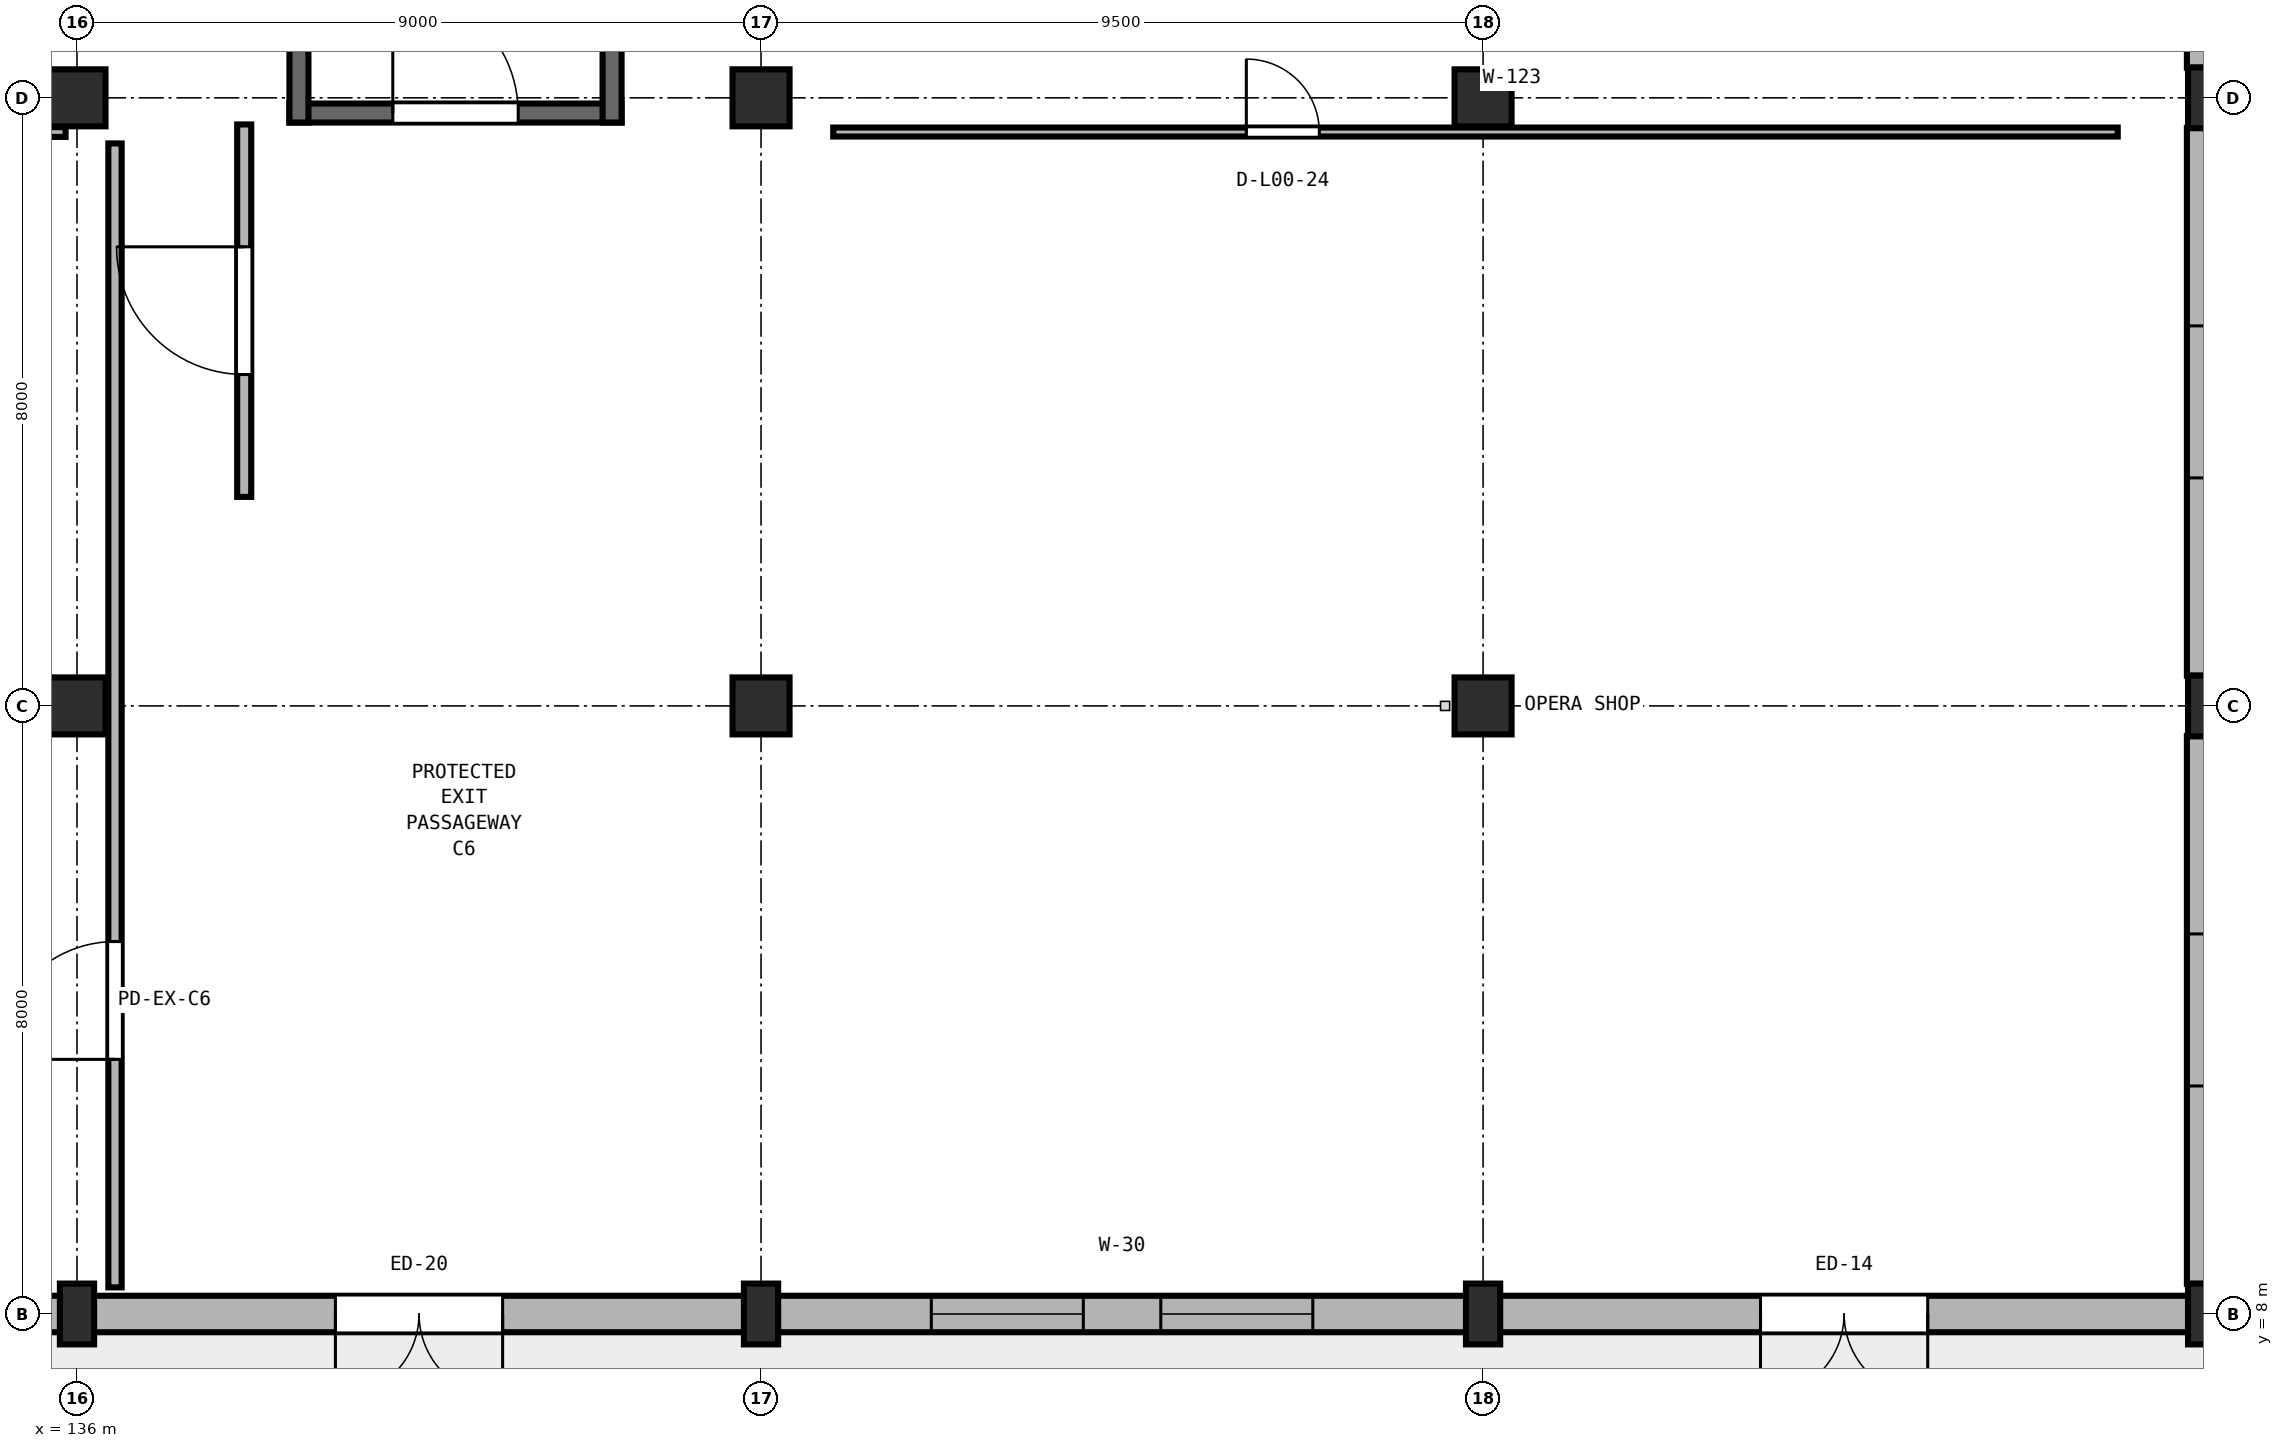
"""IFC4 building model, lengths in metres.
Left out: names, types, materials, properties, quantities, classifications, styles, units other than length and angle.
Written with IfcOpenShell. Run it as: python <this file> out.ifc"""

import sys

from ifc_helpers import new_model, si_unit, direction, frame, frame_2d, origin, origin_2d, place, context, subcontext, project, spatial, rectangle, extrude, element, fill, save


model = new_model("IFC4")
c1 = context("Model", 3, precision=1e-05, world=origin(), true_north=direction((0.0, 1.0)))
c2 = subcontext(c1, "Body", "Model", "MODEL_VIEW")
j1 = project(units=[si_unit("LENGTHUNIT", "METRE"), si_unit("PLANEANGLEUNIT", "RADIAN")], contexts=[c1])
p1 = place(None, origin())
s1 = spatial("IfcSite", under=j1, at=p1, CompositionType="ELEMENT")
p2 = place(p1, origin())
s2 = spatial("IfcBuilding", under=s1, at=p2, CompositionType="ELEMENT")
p3 = place(p2, origin())
s3 = spatial("IfcBuildingStorey", under=s2, at=p3, CompositionType="ELEMENT", Elevation=0.0)
p4 = place(p3, frame((136.0, 8.0, 0.0), z_axis=(0.0, 0.0, 1.0), x_axis=(1.0, 0.0, 0.0)))
e1 = element("IfcColumn", 1, at=p4, inside=s3, PredefinedType="PILASTER", context=c2, shape_type="SweptSolid", body=[
    extrude(rectangle(XDim=0.45, YDim=0.8, at=origin_2d()), origin(), (0.0, 0.0, 1.0), 5.12),
])
for number, where, z_axis, x_axis in (
    (2, (136.0, 16.0, 0.0), (0.0, 0.0, 1.0), (1.0, 0.0, 0.0)),
    (3, (136.0, 24.0, 0.0), (0.0, 0.0, 1.0), (1.0, 0.0, 0.0)),
):
    element("IfcColumn", number, at=place(p3, frame(where, z_axis=z_axis, x_axis=x_axis)), inside=s3, PredefinedType="COLUMN", context=c2, shape_type="SweptSolid", body=[
        extrude(rectangle(XDim=0.75, YDim=0.75, at=origin_2d()), origin(), (0.0, 0.0, 1.0), 5.12),
    ])
p5 = place(p3, frame((145.0, 8.0, 0.0), z_axis=(0.0, 0.0, 1.0), x_axis=(1.0, 0.0, 0.0)))
e4 = element("IfcColumn", 4, at=p5, inside=s3, PredefinedType="PILASTER", context=c2, shape_type="SweptSolid", body=[
    extrude(rectangle(XDim=0.45, YDim=0.8, at=origin_2d()), origin(), (0.0, 0.0, 1.0), 5.12),
])
for number, where, z_axis, x_axis in (
    (5, (145.0, 16.0, 0.0), (0.0, 0.0, 1.0), (1.0, 0.0, 0.0)),
    (6, (145.0, 24.0, 0.0), (0.0, 0.0, 1.0), (1.0, 0.0, 0.0)),
):
    element("IfcColumn", number, at=place(p3, frame(where, z_axis=z_axis, x_axis=x_axis)), inside=s3, PredefinedType="COLUMN", context=c2, shape_type="SweptSolid", body=[
        extrude(rectangle(XDim=0.75, YDim=0.75, at=origin_2d()), origin(), (0.0, 0.0, 1.0), 5.12),
    ])
p6 = place(p3, frame((154.5, 8.0, 0.0), z_axis=(0.0, 0.0, 1.0), x_axis=(1.0, 0.0, 0.0)))
e7 = element("IfcColumn", 7, at=p6, inside=s3, PredefinedType="PILASTER", context=c2, shape_type="SweptSolid", body=[
    extrude(rectangle(XDim=0.45, YDim=0.8, at=origin_2d()), origin(), (0.0, 0.0, 1.0), 5.12),
])
for number, where, z_axis, x_axis in (
    (8, (154.5, 16.0, 0.0), (0.0, 0.0, 1.0), (1.0, 0.0, 0.0)),
    (9, (154.5, 24.0, 0.0), (0.0, 0.0, 1.0), (1.0, 0.0, 0.0)),
):
    element("IfcColumn", number, at=place(p3, frame(where, z_axis=z_axis, x_axis=x_axis)), inside=s3, PredefinedType="COLUMN", context=c2, shape_type="SweptSolid", body=[
        extrude(rectangle(XDim=0.75, YDim=0.75, at=origin_2d()), origin(), (0.0, 0.0, 1.0), 5.12),
    ])
for number, where, z_axis, x_axis in (
    (10, (164.0, 8.0, 0.0), (0.0, 0.0, 1.0), (1.0, 0.0, 0.0)),
    (11, (164.0, 16.0, 0.0), (0.0, 0.0, 1.0), (1.0, 0.0, 0.0)),
    (12, (164.0, 24.0, 0.0), (0.0, 0.0, 1.0), (1.0, 0.0, 0.0)),
):
    element("IfcColumn", number, at=place(p3, frame(where, z_axis=z_axis, x_axis=x_axis)), inside=s3, PredefinedType="PILASTER", context=c2, shape_type="SweptSolid", body=[
        extrude(rectangle(XDim=0.45, YDim=0.8, at=origin_2d()), origin(), (0.0, 0.0, 1.0), 5.12),
    ])
p7 = place(p3, frame((135.779, 8.0, 0.0), z_axis=(0.0, 0.0, 1.0), x_axis=(-1.0, 0.0, 0.0)))
e13 = element("IfcWall", 13, at=p7, inside=s3, PredefinedType="SOLIDWALL", context=c2, shape_type="SweptSolid", body=[
    extrude(rectangle(XDim=8.558, YDim=0.48, at=frame_2d((4.279, 0.0))), origin(), (0.0, 0.0, 1.0), 4.731),
])
p8 = place(p7, frame((3.079, 0.0, 0.0)))
e14 = element("IfcOpeningElement", 14, at=p8, cuts=e13, PredefinedType="OPENING", context=c2, shape_type="SweptSolid", body=[
    extrude(rectangle(XDim=2.4, YDim=2.5, at=frame_2d((1.2, 1.25))), frame((0.0, 0.25, 0.0), z_axis=(0.0, -1.0, 0.0), x_axis=(1.0, 0.0, 0.0)), (0.0, 0.0, 1.0), 0.5),
])
p9 = place(p3, frame((144.779, 8.0, 0.0), z_axis=(0.0, 0.0, 1.0), x_axis=(-1.0, 0.0, 0.0)))
e15 = element("IfcWall", 15, at=p9, inside=s3, PredefinedType="SOLIDWALL", context=c2, shape_type="SweptSolid", body=[
    extrude(rectangle(XDim=8.558, YDim=0.48, at=frame_2d((4.279, 0.0))), origin(), (0.0, 0.0, 1.0), 4.731),
])
p10 = place(p9, frame((3.179, 0.0, 0.0)))
e16 = element("IfcOpeningElement", 16, at=p10, cuts=e15, PredefinedType="OPENING", context=c2, shape_type="SweptSolid", body=[
    extrude(rectangle(XDim=2.2, YDim=2.4, at=frame_2d((1.1, 1.2))), frame((0.0, 0.25, 0.0), z_axis=(0.0, -1.0, 0.0), x_axis=(1.0, 0.0, 0.0)), (0.0, 0.0, 1.0), 0.5),
])
p11 = place(p3, frame((145.221, 8.0, 0.0), z_axis=(0.0, 0.0, 1.0), x_axis=(1.0, 0.0, 0.0)))
e17 = element("IfcWall", 17, at=p11, inside=s3, PredefinedType="SOLIDWALL", context=c2, shape_type="SweptSolid", body=[
    extrude(rectangle(XDim=9.058, YDim=0.48, at=frame_2d((4.529, 0.0))), origin(), (0.0, 0.0, 1.0), 4.63),
])
p12 = place(p11, frame((2.019, 0.0, 0.75)))
e18 = element("IfcOpeningElement", 18, at=p12, cuts=e17, PredefinedType="OPENING", context=c2, shape_type="SweptSolid", body=[
    extrude(rectangle(XDim=2.0, YDim=2.9, at=frame_2d((1.0, 1.45))), frame((0.0, 0.25, 0.0), z_axis=(0.0, -1.0, 0.0), x_axis=(1.0, 0.0, 0.0)), (0.0, 0.0, 1.0), 0.5),
])
p13 = place(p11, frame((5.039, 0.0, 0.75)))
e19 = element("IfcOpeningElement", 19, at=p13, cuts=e17, PredefinedType="OPENING", context=c2, shape_type="SweptSolid", body=[
    extrude(rectangle(XDim=2.0, YDim=2.9, at=frame_2d((1.0, 1.45))), frame((0.0, 0.25, 0.0), z_axis=(0.0, -1.0, 0.0), x_axis=(1.0, 0.0, 0.0)), (0.0, 0.0, 1.0), 0.5),
])
p14 = place(p3, frame((163.779, 8.0, 0.0), z_axis=(0.0, 0.0, 1.0), x_axis=(-1.0, 0.0, 0.0)))
e20 = element("IfcWall", 20, at=p14, inside=s3, PredefinedType="SOLIDWALL", context=c2, shape_type="SweptSolid", body=[
    extrude(rectangle(XDim=9.058, YDim=0.48, at=frame_2d((4.529, 0.0))), origin(), (0.0, 0.0, 1.0), 4.63),
])
p15 = place(p14, frame((3.429, 0.0, 0.0)))
e21 = element("IfcOpeningElement", 21, at=p15, cuts=e20, PredefinedType="OPENING", context=c2, shape_type="SweptSolid", body=[
    extrude(rectangle(XDim=2.2, YDim=2.4, at=frame_2d((1.1, 1.2))), frame((0.0, 0.25, 0.0), z_axis=(0.0, -1.0, 0.0), x_axis=(1.0, 0.0, 0.0)), (0.0, 0.0, 1.0), 0.5),
])
p16 = place(p3, frame((164.0, 8.396, 0.0), z_axis=(0.0, 0.0, 1.0), x_axis=(0.0, 1.0, 0.0)))
e22 = element("IfcWall", 22, at=p16, inside=s3, PredefinedType="SOLIDWALL", context=c2, shape_type="SweptSolid", body=[
    extrude(rectangle(XDim=7.208, YDim=0.48, at=frame_2d((3.604, 0.0))), origin(), (0.0, 0.0, 1.0), 4.731),
])
p17 = place(p16, frame((2.604, 0.0, 0.85)))
e23 = element("IfcOpeningElement", 23, at=p17, cuts=e22, PredefinedType="OPENING", context=c2, shape_type="SweptSolid", body=[
    extrude(rectangle(XDim=2.0, YDim=2.9, at=frame_2d((1.0, 1.45))), frame((0.0, 0.25, 0.0), z_axis=(0.0, -1.0, 0.0), x_axis=(1.0, 0.0, 0.0)), (0.0, 0.0, 1.0), 0.5),
])
p18 = place(p3, frame((164.0, 16.396, 0.0), z_axis=(0.0, 0.0, 1.0), x_axis=(0.0, 1.0, 0.0)))
e24 = element("IfcWall", 24, at=p18, inside=s3, PredefinedType="SOLIDWALL", context=c2, shape_type="SweptSolid", body=[
    extrude(rectangle(XDim=7.208, YDim=0.48, at=frame_2d((3.604, 0.0))), origin(), (0.0, 0.0, 1.0), 4.731),
])
p19 = place(p18, frame((2.604, 0.0, 0.85)))
e25 = element("IfcOpeningElement", 25, at=p19, cuts=e24, PredefinedType="OPENING", context=c2, shape_type="SweptSolid", body=[
    extrude(rectangle(XDim=2.0, YDim=2.9, at=frame_2d((1.0, 1.45))), frame((0.0, 0.25, 0.0), z_axis=(0.0, -1.0, 0.0), x_axis=(1.0, 0.0, 0.0)), (0.0, 0.0, 1.0), 0.5),
])
p20 = place(p3, frame((164.0, 24.396, 0.0), z_axis=(0.0, 0.0, 1.0), x_axis=(0.0, 1.0, 0.0)))
e26 = element("IfcWall", 26, at=p20, inside=s3, PredefinedType="SOLIDWALL", context=c2, shape_type="SweptSolid", body=[
    extrude(rectangle(XDim=7.208, YDim=0.48, at=frame_2d((3.604, 0.0))), origin(), (0.0, 0.0, 1.0), 4.731),
])
p21 = place(p20, frame((2.554, 0.0, 0.0)))
e27 = element("IfcOpeningElement", 27, at=p21, cuts=e26, PredefinedType="OPENING", context=c2, shape_type="SweptSolid", body=[
    extrude(rectangle(XDim=2.1, YDim=2.35, at=frame_2d((1.05, 1.175))), frame((0.0, 0.25, 0.0), z_axis=(0.0, -1.0, 0.0), x_axis=(1.0, 0.0, 0.0)), (0.0, 0.0, 1.0), 0.5),
])
p22 = place(p3, frame((138.795, 23.8, 0.0), z_axis=(0.0, 0.0, 1.0), x_axis=(1.0, 0.0, 0.0)))
e28 = element("IfcWall", 28, at=p22, inside=s3, PredefinedType="SHEAR", context=c2, shape_type="SweptSolid", body=[
    extrude(rectangle(XDim=4.37, YDim=0.25, at=frame_2d((2.185, 0.0))), origin(), (0.0, 0.0, 1.0), 5.12),
])
p23 = place(p22, frame((1.36, 0.0, 0.0)))
e29 = element("IfcOpeningElement", 29, at=p23, cuts=e28, PredefinedType="OPENING", context=c2, shape_type="SweptSolid", body=[
    extrude(rectangle(XDim=1.65, YDim=2.22, at=frame_2d((0.825, 1.11))), frame((0.0, 0.135, 0.0), z_axis=(0.0, -1.0, 0.0), x_axis=(1.0, 0.0, 0.0)), (0.0, 0.0, 1.0), 0.27),
])
for number, where, z_axis, x_axis in (
    (30, (138.92, 23.675, 0.0), (0.0, 0.0, 1.0), (0.0, 1.0, 0.0)),
    (31, (143.04, 23.675, 0.0), (0.0, 0.0, 1.0), (0.0, 1.0, 0.0)),
):
    element("IfcWall", number, at=place(p3, frame(where, z_axis=z_axis, x_axis=x_axis)), inside=s3, PredefinedType="SHEAR", context=c2, shape_type="SweptSolid", body=[
        extrude(rectangle(XDim=11.09, YDim=0.25, at=frame_2d((5.545, 0.0))), origin(), (0.0, 0.0, 1.0), 5.12),
    ])
p24 = place(p3, frame((138.2, 18.75, 0.0), z_axis=(0.0, 0.0, 1.0), x_axis=(0.0, 1.0, 0.0)))
e32 = element("IfcWall", 32, at=p24, inside=s3, PredefinedType="PARTITIONING", context=c2, shape_type="SweptSolid", body=[
    extrude(rectangle(XDim=4.9, YDim=0.185, at=frame_2d((2.45, 0.0))), origin(), (0.0, 0.0, 1.0), 5.07),
])
p25 = place(p24, frame((1.61, 0.0, 0.0)))
e33 = element("IfcOpeningElement", 33, at=p25, cuts=e32, PredefinedType="OPENING", context=c2, shape_type="SweptSolid", body=[
    extrude(rectangle(XDim=1.68, YDim=2.25, at=frame_2d((0.84, 1.125))), frame((0.0, 0.103, 0.0), z_axis=(0.0, -1.0, 0.0), x_axis=(1.0, 0.0, 0.0)), (0.0, 0.0, 1.0), 0.205),
])
p26 = place(p3, frame((118.95, 23.55, 0.0), z_axis=(0.0, 0.0, 1.0), x_axis=(1.0, 0.0, 0.0)))
e34 = element("IfcWall", 34, at=p26, inside=s3, PredefinedType="PARTITIONING", context=c2, shape_type="SweptSolid", body=[
    extrude(rectangle(XDim=16.9, YDim=0.128, at=frame_2d((8.45, 0.0))), origin(), (0.0, 0.0, 1.0), 4.479),
])
p27 = place(p26, frame((5.415, 0.0, 0.0)))
e35 = element("IfcOpeningElement", 35, at=p27, cuts=e34, PredefinedType="OPENING", context=c2, shape_type="SweptSolid", body=[
    extrude(rectangle(XDim=1.0, YDim=2.15, at=frame_2d((0.5, 1.075))), frame((0.0, 0.074, 0.0), z_axis=(0.0, -1.0, 0.0), x_axis=(1.0, 0.0, 0.0)), (0.0, 0.0, 1.0), 0.148),
])
p28 = place(p3, frame((145.95, 23.55, 0.0), z_axis=(0.0, 0.0, 1.0), x_axis=(1.0, 0.0, 0.0)))
e36 = element("IfcWall", 36, at=p28, inside=s3, PredefinedType="PARTITIONING", context=c2, shape_type="SweptSolid", body=[
    extrude(rectangle(XDim=16.9, YDim=0.118, at=frame_2d((8.45, 0.0))), origin(), (0.0, 0.0, 1.0), 4.557),
])
p29 = place(p28, frame((5.435, 0.0, 0.0)))
e37 = element("IfcOpeningElement", 37, at=p29, cuts=e36, PredefinedType="OPENING", context=c2, shape_type="SweptSolid", body=[
    extrude(rectangle(XDim=0.96, YDim=2.15, at=frame_2d((0.48, 1.075))), frame((0.0, 0.069, 0.0), z_axis=(0.0, -1.0, 0.0), x_axis=(1.0, 0.0, 0.0)), (0.0, 0.0, 1.0), 0.138),
])
p30 = place(p3, frame((136.5, 8.35, 0.0), z_axis=(0.0, 0.0, 1.0), x_axis=(0.0, 1.0, 0.0)))
e38 = element("IfcWall", 38, at=p30, inside=s3, PredefinedType="PARTITIONING", context=c2, shape_type="SweptSolid", body=[
    extrude(rectangle(XDim=15.05, YDim=0.175, at=frame_2d((7.525, 0.0))), origin(), (0.0, 0.0, 1.0), 5.08),
])
p31 = place(p30, frame((3.0, 0.0, 0.0)))
e39 = element("IfcOpeningElement", 39, at=p31, cuts=e38, PredefinedType="OPENING", context=c2, shape_type="SweptSolid", body=[
    extrude(rectangle(XDim=1.55, YDim=2.22, at=frame_2d((0.775, 1.11))), frame((0.0, 0.097, 0.0), z_axis=(0.0, -1.0, 0.0), x_axis=(1.0, 0.0, 0.0)), (0.0, 0.0, 1.0), 0.195),
])
p32 = place(p10, origin())
e40 = element("IfcDoor", 40, at=p32, inside=s3, OperationType="DOUBLE_DOOR_SINGLE_SWING", PredefinedType="DOOR", context=c2, shape_type="SweptSolid", body=[
    extrude(rectangle(XDim=2.2, YDim=2.4, at=frame_2d((1.1, 1.2))), frame((0.0, 0.025, 0.0), z_axis=(0.0, -1.0, 0.0), x_axis=(1.0, 0.0, 0.0)), (0.0, 0.0, 1.0), 0.05),
])
fill(e16, e40)
p33 = place(p12, origin())
e41 = element("IfcWindow", 41, at=p33, inside=s3, PartitioningType="SINGLE_PANEL", PredefinedType="WINDOW", context=c2, shape_type="SweptSolid", body=[
    extrude(rectangle(XDim=2.0, YDim=2.9, at=frame_2d((1.0, 1.45))), frame((0.0, 0.03, 0.0), z_axis=(0.0, -1.0, 0.0), x_axis=(1.0, 0.0, 0.0)), (0.0, 0.0, 1.0), 0.06),
])
fill(e18, e41)
p34 = place(p13, origin())
e42 = element("IfcWindow", 42, at=p34, inside=s3, PartitioningType="SINGLE_PANEL", PredefinedType="WINDOW", context=c2, shape_type="SweptSolid", body=[
    extrude(rectangle(XDim=2.0, YDim=2.9, at=frame_2d((1.0, 1.45))), frame((0.0, 0.03, 0.0), z_axis=(0.0, -1.0, 0.0), x_axis=(1.0, 0.0, 0.0)), (0.0, 0.0, 1.0), 0.06),
])
fill(e19, e42)
p35 = place(p15, origin())
e43 = element("IfcDoor", 43, at=p35, inside=s3, OperationType="DOUBLE_DOOR_SINGLE_SWING", PredefinedType="DOOR", context=c2, shape_type="SweptSolid", body=[
    extrude(rectangle(XDim=2.2, YDim=2.4, at=frame_2d((1.1, 1.2))), frame((0.0, 0.025, 0.0), z_axis=(0.0, -1.0, 0.0), x_axis=(1.0, 0.0, 0.0)), (0.0, 0.0, 1.0), 0.05),
])
fill(e21, e43)
p36 = place(p17, origin())
e44 = element("IfcWindow", 44, at=p36, inside=s3, PartitioningType="SINGLE_PANEL", PredefinedType="WINDOW", context=c2, shape_type="SweptSolid", body=[
    extrude(rectangle(XDim=2.0, YDim=2.9, at=frame_2d((1.0, 1.45))), frame((0.0, 0.03, 0.0), z_axis=(0.0, -1.0, 0.0), x_axis=(1.0, 0.0, 0.0)), (0.0, 0.0, 1.0), 0.06),
])
fill(e23, e44)
p37 = place(p19, origin())
e45 = element("IfcWindow", 45, at=p37, inside=s3, PartitioningType="SINGLE_PANEL", PredefinedType="WINDOW", context=c2, shape_type="SweptSolid", body=[
    extrude(rectangle(XDim=2.0, YDim=2.9, at=frame_2d((1.0, 1.45))), frame((0.0, 0.03, 0.0), z_axis=(0.0, -1.0, 0.0), x_axis=(1.0, 0.0, 0.0)), (0.0, 0.0, 1.0), 0.06),
])
fill(e25, e45)
p38 = place(p23, origin())
e46 = element("IfcDoor", 46, at=p38, inside=s3, OperationType="SINGLE_SWING_LEFT", PredefinedType="DOOR", context=c2, shape_type="SweptSolid", body=[
    extrude(rectangle(XDim=1.65, YDim=2.22, at=frame_2d((0.825, 1.11))), frame((0.0, 0.025, 0.0), z_axis=(0.0, -1.0, 0.0), x_axis=(1.0, 0.0, 0.0)), (0.0, 0.0, 1.0), 0.05),
])
fill(e29, e46)
p39 = place(p25, origin())
e47 = element("IfcDoor", 47, at=p39, inside=s3, OperationType="SINGLE_SWING_RIGHT", PredefinedType="DOOR", context=c2, shape_type="SweptSolid", body=[
    extrude(rectangle(XDim=1.68, YDim=2.25, at=frame_2d((0.84, 1.125))), frame((0.0, 0.025, 0.0), z_axis=(0.0, -1.0, 0.0), x_axis=(1.0, 0.0, 0.0)), (0.0, 0.0, 1.0), 0.05),
])
fill(e33, e47)
p40 = place(p29, origin())
e48 = element("IfcDoor", 48, at=p40, inside=s3, OperationType="SINGLE_SWING_LEFT", PredefinedType="DOOR", context=c2, shape_type="SweptSolid", body=[
    extrude(rectangle(XDim=0.96, YDim=2.15, at=frame_2d((0.48, 1.075))), frame((0.0, 0.025, 0.0), z_axis=(0.0, -1.0, 0.0), x_axis=(1.0, 0.0, 0.0)), (0.0, 0.0, 1.0), 0.05),
])
fill(e37, e48)
p41 = place(p31, origin())
e49 = element("IfcDoor", 49, at=p41, inside=s3, OperationType="SINGLE_SWING_LEFT", PredefinedType="DOOR", context=c2, shape_type="SweptSolid", body=[
    extrude(rectangle(XDim=1.55, YDim=2.22, at=frame_2d((0.775, 1.11))), frame((0.0, 0.025, 0.0), z_axis=(0.0, -1.0, 0.0), x_axis=(1.0, 0.0, 0.0)), (0.0, 0.0, 1.0), 0.05),
])
fill(e39, e49)
save(model, sys.argv[1])
